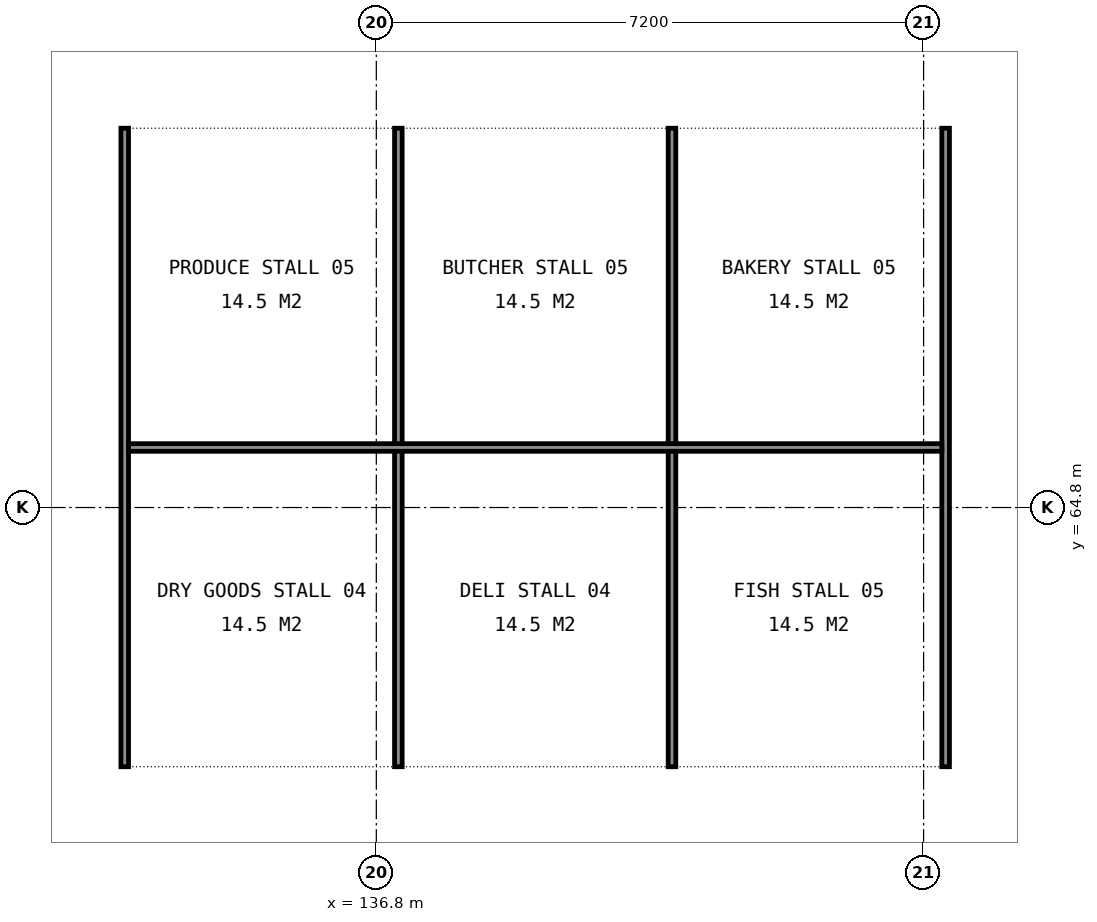
"""IFC4 building model, lengths in metres.
Left out: names, types, materials, properties, quantities, classifications, styles, units other than length and angle.
Written with IfcOpenShell. Run it as: python <this file> out.ifc"""

import sys

from ifc_helpers import new_model, si_unit, direction, frame, frame_2d, origin, place, context, subcontext, project, spatial, rectangle, extrude, element, save


model = new_model("IFC4")
c1 = context("Model", 3, precision=1e-05, world=origin(), true_north=direction((0.0, 1.0)))
c2 = subcontext(c1, "Body", "Model", "MODEL_VIEW")
j1 = project(units=[si_unit("LENGTHUNIT", "METRE"), si_unit("PLANEANGLEUNIT", "RADIAN")], contexts=[c1])
p1 = place(None, origin())
s1 = spatial("IfcSite", under=j1, at=p1, CompositionType="ELEMENT")
p2 = place(p1, origin())
s2 = spatial("IfcBuilding", under=s1, at=p2, CompositionType="ELEMENT")
p3 = place(p2, origin())
s3 = spatial("IfcBuildingStorey", under=s2, at=p3, CompositionType="ELEMENT", Elevation=0.0)
for number, where, z_axis, x_axis in (
    (1, (133.49, 61.39, 0.0), (0.0, 0.0, 1.0), (0.0, 1.0, 0.0)),
    (2, (137.09, 61.39, 0.0), (0.0, 0.0, 1.0), (0.0, 1.0, 0.0)),
    (3, (140.69, 61.39, 0.0), (0.0, 0.0, 1.0), (0.0, 1.0, 0.0)),
    (4, (144.29, 61.39, 0.0), (0.0, 0.0, 1.0), (0.0, 1.0, 0.0)),
):
    element("IfcWall", number, at=place(p3, frame(where, z_axis=z_axis, x_axis=x_axis)), inside=s3, PredefinedType="PARTITIONING", context=c2, shape_type="SweptSolid", body=[
        extrude(rectangle(XDim=8.4, YDim=0.1, at=frame_2d((4.2, 0.0))), origin(), (0.0, 0.0, 1.0), 1.2),
    ])
p4 = place(p3, frame((133.54, 65.59, 0.0), z_axis=(0.0, 0.0, 1.0), x_axis=(1.0, 0.0, 0.0)))
e5 = element("IfcWall", 5, at=p4, inside=s3, PredefinedType="PARTITIONING", context=c2, shape_type="SweptSolid", body=[
    extrude(rectangle(XDim=10.7, YDim=0.1, at=frame_2d((5.35, 0.0))), origin(), (0.0, 0.0, 1.0), 1.2),
])
save(model, sys.argv[1])
